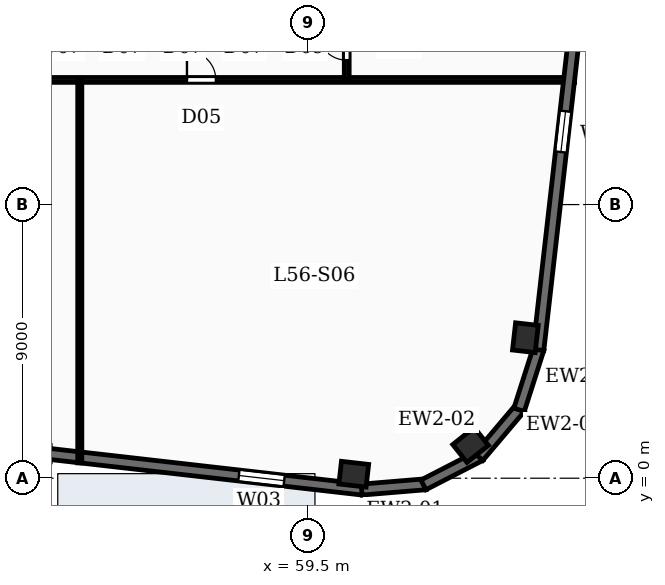
"""IFC4 building model, lengths in metres.
Left out: names, types, materials, properties, quantities, classifications, styles, units other than length and angle.
Written with IfcOpenShell. Run it as: python <this file> out.ifc"""

import sys

from ifc_helpers import new_model, si_unit, direction, frame, frame_2d, origin, origin_2d, place, context, subcontext, project, spatial, rectangle, extrude, element, fill, save


model = new_model("IFC4")
c1 = context("Model", 3, precision=1e-05, world=origin(), true_north=direction((0.0, 1.0)))
c2 = subcontext(c1, "Body", "Model", "MODEL_VIEW")
j1 = project(units=[si_unit("LENGTHUNIT", "METRE"), si_unit("PLANEANGLEUNIT", "RADIAN")], contexts=[c1])
p1 = place(None, origin())
s1 = spatial("IfcSite", under=j1, at=p1, CompositionType="ELEMENT")
p2 = place(p1, origin())
s2 = spatial("IfcBuilding", under=s1, at=p2, CompositionType="ELEMENT")
p3 = place(p2, frame((0.0, 0.0, 232.2)))
s3 = spatial("IfcBuildingStorey", under=s2, at=p3, CompositionType="ELEMENT", Elevation=232.2)
for number, where, z_axis, x_axis in (
    (1, (61.011, 0.132, -0.27), (0.0, 0.0, 1.0), (0.994, -0.113, 0.0)),
    (2, (64.854, 1.094, -0.27), (0.0, 0.0, 1.0), (0.783, 0.623, 0.0)),
    (3, (66.656, 4.622, -0.27), (0.0, 0.0, 1.0), (0.113, 0.994, 0.0)),
):
    element("IfcColumn", number, at=place(p3, frame(where, z_axis=z_axis, x_axis=x_axis)), inside=s3, PredefinedType="COLUMN", context=c2, shape_type="SweptSolid", body=[
        extrude(rectangle(XDim=0.9, YDim=0.75, at=origin_2d()), origin(), (0.0, 0.0, 1.0), 3.75),
    ])
p4 = place(p3, frame((63.37, -0.199, 0.0), z_axis=(0.0, 0.0, 1.0), x_axis=(-0.996562518477, -0.082844111233, 0.0)))
e4 = element("IfcWall", 4, at=p4, inside=s3, PredefinedType="SOLIDWALL", context=c2, shape_type="SweptSolid", body=[
    extrude(rectangle(XDim=2.107, YDim=0.36, at=frame_2d((1.054, 0.0))), origin(), (0.0, 0.0, 1.0), 3.48),
])
for number, where, z_axis, x_axis in (
    (5, (65.176, 0.746, 0.0), (0.0, 0.0, 1.0), (-0.889, -0.458, 0.0)),
    (6, (66.482, 2.31, 0.0), (0.0, 0.0, 1.0), (-0.646, -0.763, 0.0)),
):
    element("IfcWall", number, at=place(p3, frame(where, z_axis=z_axis, x_axis=x_axis)), inside=s3, PredefinedType="SOLIDWALL", context=c2, shape_type="SweptSolid", body=[
        extrude(rectangle(XDim=2.107, YDim=0.36, at=frame_2d((1.053, 0.0))), origin(), (0.0, 0.0, 1.0), 3.48),
    ])
p5 = place(p3, frame((67.091, 4.256, 0.0), z_axis=(0.0, 0.0, 1.0), x_axis=(-0.304838787518, -0.952403965565, 0.0)))
e7 = element("IfcWall", 7, at=p5, inside=s3, PredefinedType="SOLIDWALL", context=c2, shape_type="SweptSolid", body=[
    extrude(rectangle(XDim=2.107, YDim=0.36, at=frame_2d((1.054, 0.0))), origin(), (0.0, 0.0, 1.0), 3.48),
])
p6 = place(p3, frame((70.989, 38.499, 0.0), z_axis=(0.0, 0.0, 1.0), x_axis=(-0.113203107947, -0.993571867733, 0.0)))
e8 = element("IfcWall", 8, at=p6, inside=s3, PredefinedType="SOLIDWALL", context=c2, shape_type="SweptSolid", body=[
    extrude(rectangle(XDim=34.5, YDim=0.36, at=frame_2d((17.25, 0.0))), origin(), (0.0, 0.0, 1.0), 3.48),
])
p7 = place(p6, frame((4.2, 0.0, 0.88)))
e9 = element("IfcOpeningElement", 9, at=p7, cuts=e8, PredefinedType="OPENING", context=c2, shape_type="SweptSolid", body=[
    extrude(rectangle(XDim=1.35, YDim=2.2, at=frame_2d((0.675, 1.1))), frame((0.0, 0.19, 0.0), z_axis=(0.0, -1.0, 0.0), x_axis=(1.0, 0.0, 0.0)), (0.0, 0.0, 1.0), 0.38),
])
p8 = place(p6, frame((15.4, 0.0, 0.88)))
e10 = element("IfcOpeningElement", 10, at=p8, cuts=e8, PredefinedType="OPENING", context=c2, shape_type="SweptSolid", body=[
    extrude(rectangle(XDim=1.35, YDim=2.2, at=frame_2d((0.675, 1.1))), frame((0.0, 0.19, 0.0), z_axis=(0.0, -1.0, 0.0), x_axis=(1.0, 0.0, 0.0)), (0.0, 0.0, 1.0), 0.38),
])
p9 = place(p6, frame((26.6, 0.0, 0.88)))
e11 = element("IfcOpeningElement", 11, at=p9, cuts=e8, PredefinedType="OPENING", context=c2, shape_type="SweptSolid", body=[
    extrude(rectangle(XDim=1.35, YDim=2.2, at=frame_2d((0.675, 1.1))), frame((0.0, 0.19, 0.0), z_axis=(0.0, -1.0, 0.0), x_axis=(1.0, 0.0, 0.0)), (0.0, 0.0, 1.0), 0.38),
])
p10 = place(p3, frame((61.306, -0.375, 0.0), z_axis=(0.0, 0.0, 1.0), x_axis=(-0.993571958919, 0.113202307616, 0.0)))
e12 = element("IfcWall", 12, at=p10, inside=s3, PredefinedType="SOLIDWALL", context=c2, shape_type="SweptSolid", body=[
    extrude(rectangle(XDim=46.8, YDim=0.36, at=frame_2d((23.4, 0.0))), origin(), (0.0, 0.0, 1.0), 3.48),
])
p11 = place(p10, frame((2.6, 0.0, 0.88)))
e13 = element("IfcOpeningElement", 13, at=p11, cuts=e12, PredefinedType="OPENING", context=c2, shape_type="SweptSolid", body=[
    extrude(rectangle(XDim=1.5, YDim=2.05, at=frame_2d((0.75, 1.025))), frame((0.0, 0.19, 0.0), z_axis=(0.0, -1.0, 0.0), x_axis=(1.0, 0.0, 0.0)), (0.0, 0.0, 1.0), 0.38),
])
p12 = place(p10, frame((13.4, 0.0, 0.88)))
e14 = element("IfcOpeningElement", 14, at=p12, cuts=e12, PredefinedType="OPENING", context=c2, shape_type="SweptSolid", body=[
    extrude(rectangle(XDim=1.5, YDim=2.05, at=frame_2d((0.75, 1.025))), frame((0.0, 0.19, 0.0), z_axis=(0.0, -1.0, 0.0), x_axis=(1.0, 0.0, 0.0)), (0.0, 0.0, 1.0), 0.38),
])
p13 = place(p10, frame((18.8, 0.0, 0.88)))
e15 = element("IfcOpeningElement", 15, at=p13, cuts=e12, PredefinedType="OPENING", context=c2, shape_type="SweptSolid", body=[
    extrude(rectangle(XDim=1.5, YDim=2.05, at=frame_2d((0.75, 1.025))), frame((0.0, 0.19, 0.0), z_axis=(0.0, -1.0, 0.0), x_axis=(1.0, 0.0, 0.0)), (0.0, 0.0, 1.0), 0.38),
])
p14 = place(p10, frame((40.4, 0.0, 0.88)))
e16 = element("IfcOpeningElement", 16, at=p14, cuts=e12, PredefinedType="OPENING", context=c2, shape_type="SweptSolid", body=[
    extrude(rectangle(XDim=1.5, YDim=2.05, at=frame_2d((0.75, 1.025))), frame((0.0, 0.19, 0.0), z_axis=(0.0, -1.0, 0.0), x_axis=(1.0, 0.0, 0.0)), (0.0, 0.0, 1.0), 0.38),
])
p15 = place(p3, frame((52.0, 0.505, 0.0), z_axis=(0.0, 0.0, 1.0), x_axis=(0.0, 1.0, 0.0)))
e17 = element("IfcWall", 17, at=p15, inside=s3, PredefinedType="PARTITIONING", context=c2, shape_type="SweptSolid", body=[
    extrude(rectangle(XDim=12.595, YDim=0.135, at=frame_2d((6.298, 0.0))), origin(), (0.0, 0.0, 1.0), 2.54),
])
p16 = place(p3, frame((10.303, 13.1, 0.0), z_axis=(0.0, 0.0, 1.0), x_axis=(1.0, 0.0, 0.0)))
e18 = element("IfcWall", 18, at=p16, inside=s3, PredefinedType="PARTITIONING", context=c2, shape_type="SweptSolid", body=[
    extrude(rectangle(XDim=57.973, YDim=0.16, at=frame_2d((28.986, 0.0))), origin(), (0.0, 0.0, 1.0), 2.54),
])
p17 = place(p16, frame((8.922, 0.0, 0.0)))
e19 = element("IfcOpeningElement", 19, at=p17, cuts=e18, PredefinedType="OPENING", context=c2, shape_type="SweptSolid", body=[
    extrude(rectangle(XDim=0.95, YDim=2.15, at=frame_2d((0.475, 1.075))), frame((0.0, 0.09, 0.0), z_axis=(0.0, -1.0, 0.0), x_axis=(1.0, 0.0, 0.0)), (0.0, 0.0, 1.0), 0.18),
])
p18 = place(p16, frame((17.222, 0.0, 0.0)))
e20 = element("IfcOpeningElement", 20, at=p18, cuts=e18, PredefinedType="OPENING", context=c2, shape_type="SweptSolid", body=[
    extrude(rectangle(XDim=0.95, YDim=2.15, at=frame_2d((0.475, 1.075))), frame((0.0, 0.09, 0.0), z_axis=(0.0, -1.0, 0.0), x_axis=(1.0, 0.0, 0.0)), (0.0, 0.0, 1.0), 0.18),
])
p19 = place(p16, frame((24.222, 0.0, 0.0)))
e21 = element("IfcOpeningElement", 21, at=p19, cuts=e18, PredefinedType="OPENING", context=c2, shape_type="SweptSolid", body=[
    extrude(rectangle(XDim=0.95, YDim=2.15, at=frame_2d((0.475, 1.075))), frame((0.0, 0.09, 0.0), z_axis=(0.0, -1.0, 0.0), x_axis=(1.0, 0.0, 0.0)), (0.0, 0.0, 1.0), 0.18),
])
p20 = place(p16, frame((31.222, 0.0, 0.0)))
e22 = element("IfcOpeningElement", 22, at=p20, cuts=e18, PredefinedType="OPENING", context=c2, shape_type="SweptSolid", body=[
    extrude(rectangle(XDim=0.95, YDim=2.15, at=frame_2d((0.475, 1.075))), frame((0.0, 0.09, 0.0), z_axis=(0.0, -1.0, 0.0), x_axis=(1.0, 0.0, 0.0)), (0.0, 0.0, 1.0), 0.18),
])
p21 = place(p16, frame((37.972, 0.0, 0.0)))
e23 = element("IfcOpeningElement", 23, at=p21, cuts=e18, PredefinedType="OPENING", context=c2, shape_type="SweptSolid", body=[
    extrude(rectangle(XDim=0.95, YDim=2.15, at=frame_2d((0.475, 1.075))), frame((0.0, 0.09, 0.0), z_axis=(0.0, -1.0, 0.0), x_axis=(1.0, 0.0, 0.0)), (0.0, 0.0, 1.0), 0.18),
])
p22 = place(p16, frame((45.222, 0.0, 0.0)))
e24 = element("IfcOpeningElement", 24, at=p22, cuts=e18, PredefinedType="OPENING", context=c2, shape_type="SweptSolid", body=[
    extrude(rectangle(XDim=0.95, YDim=2.15, at=frame_2d((0.475, 1.075))), frame((0.0, 0.09, 0.0), z_axis=(0.0, -1.0, 0.0), x_axis=(1.0, 0.0, 0.0)), (0.0, 0.0, 1.0), 0.18),
])
p23 = place(p3, frame((60.78, 13.1, 0.0), z_axis=(0.0, 0.0, 1.0), x_axis=(0.0, 1.0, 0.0)))
e25 = element("IfcWall", 25, at=p23, inside=s3, PredefinedType="PARTITIONING", context=c2, shape_type="SweptSolid", body=[
    extrude(rectangle(XDim=2.3, YDim=0.16, at=frame_2d((1.15, 0.0))), origin(), (0.0, 0.0, 1.0), 2.54),
])
p24 = place(p23, frame((0.65, 0.0, 0.0)))
e26 = element("IfcOpeningElement", 26, at=p24, cuts=e25, PredefinedType="OPENING", context=c2, shape_type="SweptSolid", body=[
    extrude(rectangle(XDim=0.95, YDim=2.15, at=frame_2d((0.475, 1.075))), frame((0.0, 0.09, 0.0), z_axis=(0.0, -1.0, 0.0), x_axis=(1.0, 0.0, 0.0)), (0.0, 0.0, 1.0), 0.18),
])
p25 = place(p9, origin())
e27 = element("IfcWindow", 27, at=p25, inside=s3, PartitioningType="SINGLE_PANEL", PredefinedType="WINDOW", context=c2, shape_type="SweptSolid", body=[
    extrude(rectangle(XDim=1.35, YDim=2.2, at=frame_2d((0.675, 1.1))), frame((0.0, 0.03, 0.0), z_axis=(0.0, -1.0, 0.0), x_axis=(1.0, 0.0, 0.0)), (0.0, 0.0, 1.0), 0.06),
])
fill(e11, e27)
p26 = place(p11, origin())
e28 = element("IfcWindow", 28, at=p26, inside=s3, PartitioningType="SINGLE_PANEL", PredefinedType="WINDOW", context=c2, shape_type="SweptSolid", body=[
    extrude(rectangle(XDim=1.5, YDim=2.05, at=frame_2d((0.75, 1.025))), frame((0.0, 0.03, 0.0), z_axis=(0.0, -1.0, 0.0), x_axis=(1.0, 0.0, 0.0)), (0.0, 0.0, 1.0), 0.06),
])
fill(e13, e28)
p27 = place(p22, origin())
e29 = element("IfcDoor", 29, at=p27, inside=s3, OperationType="SINGLE_SWING_LEFT", PredefinedType="DOOR", context=c2, shape_type="SweptSolid", body=[
    extrude(rectangle(XDim=0.95, YDim=2.15, at=frame_2d((0.475, 1.075))), frame((0.0, 0.025, 0.0), z_axis=(0.0, -1.0, 0.0), x_axis=(1.0, 0.0, 0.0)), (0.0, 0.0, 1.0), 0.05),
])
fill(e24, e29)
p28 = place(p24, origin())
e30 = element("IfcDoor", 30, at=p28, inside=s3, OperationType="SINGLE_SWING_RIGHT", PredefinedType="DOOR", context=c2, shape_type="SweptSolid", body=[
    extrude(rectangle(XDim=0.95, YDim=2.15, at=frame_2d((0.475, 1.075))), frame((0.0, 0.025, 0.0), z_axis=(0.0, -1.0, 0.0), x_axis=(1.0, 0.0, 0.0)), (0.0, 0.0, 1.0), 0.05),
])
fill(e26, e30)
save(model, sys.argv[1])
